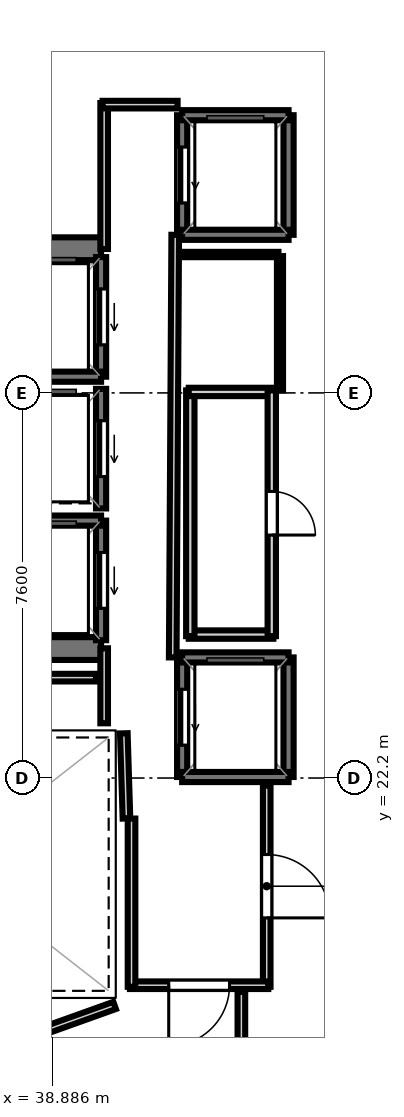
"""IFC4 building model, lengths in metres.
Left out: names, types, materials, properties, quantities, classifications, styles, units other than length and angle.
Written with IfcOpenShell. Run it as: python <this file> out.ifc"""

import sys

from ifc_helpers import new_model, si_unit, direction, frame, frame_2d, origin, place, context, subcontext, project, spatial, rectangle, extrude, element, fill, save


model = new_model("IFC4")
c1 = context("Model", 3, precision=1e-05, world=origin(), true_north=direction((0.0, 1.0)))
c2 = subcontext(c1, "Body", "Model", "MODEL_VIEW")
j1 = project(units=[si_unit("LENGTHUNIT", "METRE"), si_unit("PLANEANGLEUNIT", "RADIAN")], contexts=[c1])
p1 = place(None, origin())
s1 = spatial("IfcSite", under=j1, at=p1, CompositionType="ELEMENT")
p2 = place(p1, origin())
s2 = spatial("IfcBuilding", under=s1, at=p2, CompositionType="ELEMENT")
p3 = place(p2, frame((0.0, 0.0, 344.4)))
s3 = spatial("IfcBuildingStorey", under=s2, at=p3, CompositionType="ELEMENT", Elevation=344.4)
p4 = place(p3, frame((29.33, 32.645, 0.0), z_axis=(0.0, 0.0, 1.0), x_axis=(1.0, 0.0, 0.0)))
e1 = element("IfcWall", 1, at=p4, inside=s3, PredefinedType="SHEAR", context=c2, shape_type="SweptSolid", body=[
    extrude(rectangle(XDim=10.52, YDim=0.45, at=frame_2d((5.26, 0.0))), origin(), (0.0, 0.0, 1.0), 3.52),
])
p5 = place(p4, frame((0.895, 0.0, 0.0)))
e2 = element("IfcOpeningElement", 2, at=p5, cuts=e1, PredefinedType="OPENING", context=c2, shape_type="SweptSolid", body=[
    extrude(rectangle(XDim=1.25, YDim=2.15, at=frame_2d((0.625, 1.075))), frame((0.0, 0.235, 0.0), z_axis=(0.0, -1.0, 0.0), x_axis=(1.0, 0.0, 0.0)), (0.0, 0.0, 1.0), 0.47),
])
p6 = place(p3, frame((29.33, 24.755, 0.0), z_axis=(0.0, 0.0, 1.0), x_axis=(1.0, 0.0, 0.0)))
e3 = element("IfcWall", 3, at=p6, inside=s3, PredefinedType="SHEAR", context=c2, shape_type="SweptSolid", body=[
    extrude(rectangle(XDim=10.52, YDim=0.45, at=frame_2d((5.26, 0.0))), origin(), (0.0, 0.0, 1.0), 3.52),
])
p7 = place(p6, frame((0.695, 0.0, 0.0)))
e4 = element("IfcOpeningElement", 4, at=p7, cuts=e3, PredefinedType="OPENING", context=c2, shape_type="SweptSolid", body=[
    extrude(rectangle(XDim=1.25, YDim=2.15, at=frame_2d((0.625, 1.075))), frame((0.0, 0.235, 0.0), z_axis=(0.0, -1.0, 0.0), x_axis=(1.0, 0.0, 0.0)), (0.0, 0.0, 1.0), 0.47),
])
p8 = place(p3, frame((39.85, 30.12, 0.0), z_axis=(0.0, 0.0, 1.0), x_axis=(0.0, 1.0, 0.0)))
e5 = element("IfcWall", 5, at=p8, inside=s3, PredefinedType="SOLIDWALL", context=c2, shape_type="SweptSolid", body=[
    extrude(rectangle(XDim=2.36, YDim=0.2, at=frame_2d((1.18, 0.0))), origin(), (0.0, 0.0, 1.0), 3.52),
])
p9 = place(p8, frame((0.63, 0.0, 0.0)))
e6 = element("IfcOpeningElement", 6, at=p9, cuts=e5, PredefinedType="OPENING", context=c2, shape_type="SweptSolid", body=[
    extrude(rectangle(XDim=1.1, YDim=2.15, at=frame_2d((0.55, 1.075))), frame((0.0, 0.11, 0.0), z_axis=(0.0, -1.0, 0.0), x_axis=(1.0, 0.0, 0.0)), (0.0, 0.0, 1.0), 0.22),
])
p10 = place(p3, frame((37.75, 30.12, 0.0), z_axis=(0.0, 0.0, 1.0), x_axis=(1.0, 0.0, 0.0)))
e7 = element("IfcWall", 7, at=p10, inside=s3, PredefinedType="SOLIDWALL", context=c2, shape_type="SweptSolid", body=[
    extrude(rectangle(XDim=2.1, YDim=0.2, at=frame_2d((1.05, 0.0))), origin(), (0.0, 0.0, 1.0), 3.52),
])
p11 = place(p3, frame((39.85, 24.92, 0.0), z_axis=(0.0, 0.0, 1.0), x_axis=(0.0, 1.0, 0.0)))
e8 = element("IfcWall", 8, at=p11, inside=s3, PredefinedType="SOLIDWALL", context=c2, shape_type="SweptSolid", body=[
    extrude(rectangle(XDim=2.36, YDim=0.2, at=frame_2d((1.18, 0.0))), origin(), (0.0, 0.0, 1.0), 3.52),
])
p12 = place(p11, frame((0.63, 0.0, 0.0)))
e9 = element("IfcOpeningElement", 9, at=p12, cuts=e8, PredefinedType="OPENING", context=c2, shape_type="SweptSolid", body=[
    extrude(rectangle(XDim=1.1, YDim=2.15, at=frame_2d((0.55, 1.075))), frame((0.0, 0.11, 0.0), z_axis=(0.0, -1.0, 0.0), x_axis=(1.0, 0.0, 0.0)), (0.0, 0.0, 1.0), 0.22),
])
p13 = place(p3, frame((37.75, 27.28, 0.0), z_axis=(0.0, 0.0, 1.0), x_axis=(1.0, 0.0, 0.0)))
e10 = element("IfcWall", 10, at=p13, inside=s3, PredefinedType="SOLIDWALL", context=c2, shape_type="SweptSolid", body=[
    extrude(rectangle(XDim=2.1, YDim=0.2, at=frame_2d((1.05, 0.0))), origin(), (0.0, 0.0, 1.0), 3.52),
])
p14 = place(p3, frame((39.85, 27.52, 0.0), z_axis=(0.0, 0.0, 1.0), x_axis=(0.0, 1.0, 0.0)))
e11 = element("IfcWall", 11, at=p14, inside=s3, PredefinedType="SOLIDWALL", context=c2, shape_type="SweptSolid", body=[
    extrude(rectangle(XDim=2.36, YDim=0.2, at=frame_2d((1.18, 0.0))), origin(), (0.0, 0.0, 1.0), 3.52),
])
p15 = place(p14, frame((0.63, 0.0, 0.0)))
e12 = element("IfcOpeningElement", 12, at=p15, cuts=e11, PredefinedType="OPENING", context=c2, shape_type="SweptSolid", body=[
    extrude(rectangle(XDim=1.1, YDim=2.15, at=frame_2d((0.55, 1.075))), frame((0.0, 0.11, 0.0), z_axis=(0.0, -1.0, 0.0), x_axis=(1.0, 0.0, 0.0)), (0.0, 0.0, 1.0), 0.22),
])
p16 = place(p3, frame((43.55, 22.22, 0.0), z_axis=(0.0, 0.0, 1.0), x_axis=(0.0, 1.0, 0.0)))
e13 = element("IfcWall", 13, at=p16, inside=s3, PredefinedType="SOLIDWALL", context=c2, shape_type="SweptSolid", body=[
    extrude(rectangle(XDim=2.36, YDim=0.2, at=frame_2d((1.18, 0.0))), origin(), (0.0, 0.0, 1.0), 3.52),
])
p17 = place(p3, frame((41.45, 22.22, 0.0), z_axis=(0.0, 0.0, 1.0), x_axis=(0.0, 1.0, 0.0)))
e14 = element("IfcWall", 14, at=p17, inside=s3, PredefinedType="SOLIDWALL", context=c2, shape_type="SweptSolid", body=[
    extrude(rectangle(XDim=2.36, YDim=0.2, at=frame_2d((1.18, 0.0))), origin(), (0.0, 0.0, 1.0), 3.52),
])
p18 = place(p17, frame((0.63, 0.0, 0.0)))
e15 = element("IfcOpeningElement", 15, at=p18, cuts=e14, PredefinedType="OPENING", context=c2, shape_type="SweptSolid", body=[
    extrude(rectangle(XDim=1.1, YDim=2.15, at=frame_2d((0.55, 1.075))), frame((0.0, 0.11, 0.0), z_axis=(0.0, -1.0, 0.0), x_axis=(1.0, 0.0, 0.0)), (0.0, 0.0, 1.0), 0.22),
])
for number, where, z_axis, x_axis in (
    (16, (41.45, 24.58, 0.0), (0.0, 0.0, 1.0), (1.0, 0.0, 0.0)),
    (17, (41.45, 22.22, 0.0), (0.0, 0.0, 1.0), (1.0, 0.0, 0.0)),
):
    element("IfcWall", number, at=place(p3, frame(where, z_axis=z_axis, x_axis=x_axis)), inside=s3, PredefinedType="SOLIDWALL", context=c2, shape_type="SweptSolid", body=[
        extrude(rectangle(XDim=2.1, YDim=0.2, at=frame_2d((1.05, 0.0))), origin(), (0.0, 0.0, 1.0), 3.52),
    ])
p19 = place(p3, frame((43.55, 32.92, 0.0), z_axis=(0.0, 0.0, 1.0), x_axis=(0.0, 1.0, 0.0)))
e18 = element("IfcWall", 18, at=p19, inside=s3, PredefinedType="SOLIDWALL", context=c2, shape_type="SweptSolid", body=[
    extrude(rectangle(XDim=2.36, YDim=0.2, at=frame_2d((1.18, 0.0))), origin(), (0.0, 0.0, 1.0), 3.52),
])
p20 = place(p3, frame((41.45, 32.92, 0.0), z_axis=(0.0, 0.0, 1.0), x_axis=(0.0, 1.0, 0.0)))
e19 = element("IfcWall", 19, at=p20, inside=s3, PredefinedType="SOLIDWALL", context=c2, shape_type="SweptSolid", body=[
    extrude(rectangle(XDim=2.36, YDim=0.2, at=frame_2d((1.18, 0.0))), origin(), (0.0, 0.0, 1.0), 3.52),
])
p21 = place(p20, frame((0.63, 0.0, 0.0)))
e20 = element("IfcOpeningElement", 20, at=p21, cuts=e19, PredefinedType="OPENING", context=c2, shape_type="SweptSolid", body=[
    extrude(rectangle(XDim=1.1, YDim=2.15, at=frame_2d((0.55, 1.075))), frame((0.0, 0.11, 0.0), z_axis=(0.0, -1.0, 0.0), x_axis=(1.0, 0.0, 0.0)), (0.0, 0.0, 1.0), 0.22),
])
for number, where, z_axis, x_axis in (
    (21, (41.45, 35.28, 0.0), (0.0, 0.0, 1.0), (1.0, 0.0, 0.0)),
    (22, (41.45, 32.92, 0.0), (0.0, 0.0, 1.0), (1.0, 0.0, 0.0)),
):
    element("IfcWall", number, at=place(p3, frame(where, z_axis=z_axis, x_axis=x_axis)), inside=s3, PredefinedType="SOLIDWALL", context=c2, shape_type="SweptSolid", body=[
        extrude(rectangle(XDim=2.1, YDim=0.2, at=frame_2d((1.05, 0.0))), origin(), (0.0, 0.0, 1.0), 3.52),
    ])
p22 = place(p3, frame((40.351, 21.401, 0.0), z_axis=(0.0, 0.0, 1.0), x_axis=(-0.031058045979, 0.999517582527, 0.0)))
e23 = element("IfcWall", 23, at=p22, inside=s3, PredefinedType="PARTITIONING", context=c2, shape_type="SweptSolid", body=[
    extrude(rectangle(XDim=1.682, YDim=0.15, at=frame_2d((0.841, 0.0))), origin(), (0.0, 0.0, 1.0), 2.84),
])
p23 = place(p3, frame((39.911, 23.28, 0.0), z_axis=(0.0, 0.0, 1.0), x_axis=(0.0, 1.0, 0.0)))
e24 = element("IfcWall", 24, at=p23, inside=s3, PredefinedType="PARTITIONING", context=c2, shape_type="SweptSolid", body=[
    extrude(rectangle(XDim=1.48, YDim=0.15, at=frame_2d((0.74, 0.0))), origin(), (0.0, 0.0, 1.0), 2.84),
])
p24 = place(p3, frame((39.911, 32.64, 0.0), z_axis=(0.0, 0.0, 1.0), x_axis=(0.0, 1.0, 0.0)))
e25 = element("IfcWall", 25, at=p24, inside=s3, PredefinedType="PARTITIONING", context=c2, shape_type="SweptSolid", body=[
    extrude(rectangle(XDim=2.88, YDim=0.15, at=frame_2d((1.44, 0.0))), origin(), (0.0, 0.0, 1.0), 2.84),
])
p25 = place(p3, frame((39.88, 35.489, 0.0), z_axis=(0.0, 0.0, 1.0), x_axis=(1.0, 0.0, 0.0)))
e26 = element("IfcWall", 26, at=p25, inside=s3, PredefinedType="PARTITIONING", context=c2, shape_type="SweptSolid", body=[
    extrude(rectangle(XDim=1.48, YDim=0.15, at=frame_2d((0.74, 0.0))), origin(), (0.0, 0.0, 1.0), 2.84),
])
p26 = place(p3, frame((41.313, 32.92, 0.0), z_axis=(0.0, 0.0, 1.0), x_axis=(-0.005942518022, -0.999982343084, 0.0)))
e27 = element("IfcWall", 27, at=p26, inside=s3, PredefinedType="PARTITIONING", context=c2, shape_type="SweptSolid", body=[
    extrude(rectangle(XDim=8.34, YDim=0.15, at=frame_2d((4.17, 0.0))), origin(), (0.0, 0.0, 1.0), 2.84),
])
p27 = place(p3, frame((43.119, 22.05, 0.0), z_axis=(0.0, 0.0, 1.0), x_axis=(0.0, -1.0, 0.0)))
e28 = element("IfcWall", 28, at=p27, inside=s3, PredefinedType="PARTITIONING", context=c2, shape_type="SweptSolid", body=[
    extrude(rectangle(XDim=3.97, YDim=0.15, at=frame_2d((1.985, 0.0))), origin(), (0.0, 0.0, 1.0), 2.84),
])
p28 = place(p27, frame((1.36, 0.0, 0.0)))
e29 = element("IfcOpeningElement", 29, at=p28, cuts=e28, PredefinedType="OPENING", context=c2, shape_type="SweptSolid", body=[
    extrude(rectangle(XDim=1.25, YDim=2.2, at=frame_2d((0.625, 1.1))), frame((0.0, 0.085, 0.0), z_axis=(0.0, -1.0, 0.0), x_axis=(1.0, 0.0, 0.0)), (0.0, 0.0, 1.0), 0.17),
])
p29 = place(p3, frame((43.15, 18.111, 0.0), z_axis=(0.0, 0.0, 1.0), x_axis=(-1.0, 0.0, 0.0)))
e30 = element("IfcWall", 30, at=p29, inside=s3, PredefinedType="PARTITIONING", context=c2, shape_type="SweptSolid", body=[
    extrude(rectangle(XDim=2.73, YDim=0.15, at=frame_2d((1.365, 0.0))), origin(), (0.0, 0.0, 1.0), 2.84),
])
p30 = place(p29, frame((0.765, 0.0, 0.0)))
e31 = element("IfcOpeningElement", 31, at=p30, cuts=e30, PredefinedType="OPENING", context=c2, shape_type="SweptSolid", body=[
    extrude(rectangle(XDim=1.2, YDim=2.15, at=frame_2d((0.6, 1.075))), frame((0.0, 0.085, 0.0), z_axis=(0.0, -1.0, 0.0), x_axis=(1.0, 0.0, 0.0)), (0.0, 0.0, 1.0), 0.17),
])
p31 = place(p3, frame((40.451, 18.08, 0.0), z_axis=(0.0, 0.0, 1.0), x_axis=(0.0, 1.0, 0.0)))
e32 = element("IfcWall", 32, at=p31, inside=s3, PredefinedType="PARTITIONING", context=c2, shape_type="SweptSolid", body=[
    extrude(rectangle(XDim=3.32, YDim=0.15, at=frame_2d((1.66, 0.0))), origin(), (0.0, 0.0, 1.0), 2.84),
])
p32 = place(p3, frame((43.25, 25.031, 0.0), z_axis=(0.0, 0.0, 1.0), x_axis=(-1.0, 0.0, 0.0)))
e33 = element("IfcWall", 33, at=p32, inside=s3, PredefinedType="PLUMBINGWALL", context=c2, shape_type="SweptSolid", body=[
    extrude(rectangle(XDim=1.67, YDim=0.165, at=frame_2d((0.835, 0.0))), origin(), (0.0, 0.0, 1.0), 2.84),
])
p33 = place(p3, frame((41.611, 25.0, 0.0), z_axis=(0.0, 0.0, 1.0), x_axis=(0.0, 1.0, 0.0)))
e34 = element("IfcWall", 34, at=p33, inside=s3, PredefinedType="PLUMBINGWALL", context=c2, shape_type="SweptSolid", body=[
    extrude(rectangle(XDim=4.85, YDim=0.165, at=frame_2d((2.425, 0.0))), origin(), (0.0, 0.0, 1.0), 2.84),
])
p34 = place(p3, frame((41.58, 29.819, 0.0), z_axis=(0.0, 0.0, 1.0), x_axis=(1.0, 0.0, 0.0)))
e35 = element("IfcWall", 35, at=p34, inside=s3, PredefinedType="PLUMBINGWALL", context=c2, shape_type="SweptSolid", body=[
    extrude(rectangle(XDim=1.67, YDim=0.165, at=frame_2d((0.835, 0.0))), origin(), (0.0, 0.0, 1.0), 2.84),
])
p35 = place(p3, frame((43.219, 29.85, 0.0), z_axis=(0.0, 0.0, 1.0), x_axis=(0.0, -1.0, 0.0)))
e36 = element("IfcWall", 36, at=p35, inside=s3, PredefinedType="PLUMBINGWALL", context=c2, shape_type="SweptSolid", body=[
    extrude(rectangle(XDim=4.85, YDim=0.165, at=frame_2d((2.425, 0.0))), origin(), (0.0, 0.0, 1.0), 2.84),
])
p36 = place(p35, frame((1.995, 0.0, 0.0)))
e37 = element("IfcOpeningElement", 37, at=p36, cuts=e36, PredefinedType="OPENING", context=c2, shape_type="SweptSolid", body=[
    extrude(rectangle(XDim=0.86, YDim=2.05, at=frame_2d((0.43, 1.025))), frame((0.0, 0.093, 0.0), z_axis=(0.0, -1.0, 0.0), x_axis=(1.0, 0.0, 0.0)), (0.0, 0.0, 1.0), 0.185),
])
p37 = place(p3, frame((39.75, 24.181, 0.0), z_axis=(0.0, 0.0, 1.0), x_axis=(-1.0, 0.0, 0.0)))
e38 = element("IfcWall", 38, at=p37, inside=s3, PredefinedType="PARTITIONING", context=c2, shape_type="SweptSolid", body=[
    extrude(rectangle(XDim=6.22, YDim=0.15, at=frame_2d((3.11, 0.0))), origin(), (0.0, 0.0, 1.0), 2.84),
])
p38 = place(p3, frame((36.81, 16.529, 0.0), z_axis=(0.0, 0.0, 1.0), x_axis=(0.941548344365, 0.33687789364, 0.0)))
e39 = element("IfcWall", 39, at=p38, inside=s3, PredefinedType="PARTITIONING", context=c2, shape_type="SweptSolid", body=[
    extrude(rectangle(XDim=3.513, YDim=0.15, at=frame_2d((1.756, 0.0))), origin(), (0.0, 0.0, 1.0), 2.84),
])
p39 = place(p3, frame((42.619, 17.98, 0.0), z_axis=(0.0, 0.0, 1.0), x_axis=(0.0, -1.0, 0.0)))
e40 = element("IfcWall", 40, at=p39, inside=s3, PredefinedType="PARTITIONING", context=c2, shape_type="SweptSolid", body=[
    extrude(rectangle(XDim=1.93, YDim=0.15, at=frame_2d((0.965, 0.0))), origin(), (0.0, 0.0, 1.0), 2.84),
])
p40 = place(p3, frame((43.381, 29.85, 0.0), z_axis=(0.0, 0.0, 1.0), x_axis=(0.0, 1.0, 0.0)))
e41 = element("IfcWall", 41, at=p40, inside=s3, PredefinedType="PARTITIONING", context=c2, shape_type="SweptSolid", body=[
    extrude(rectangle(XDim=2.65, YDim=0.12, at=frame_2d((1.325, 0.0))), origin(), (0.0, 0.0, 1.0), 2.84),
])
p41 = place(p3, frame((43.35, 32.531, 0.0), z_axis=(0.0, 0.0, 1.0), x_axis=(-1.0, 0.0, 0.0)))
e42 = element("IfcWall", 42, at=p41, inside=s3, PredefinedType="PARTITIONING", context=c2, shape_type="SweptSolid", body=[
    extrude(rectangle(XDim=1.91, YDim=0.105, at=frame_2d((0.955, 0.0))), origin(), (0.0, 0.0, 1.0), 2.84),
])
p42 = place(p3, frame((53.102, 40.593, 0.0), z_axis=(0.0, 0.0, 1.0), x_axis=(-0.337534144826, -0.941313285297, 0.0)))
e43 = element("IfcWall", 43, at=p42, inside=s3, PredefinedType="PARTITIONING", context=c2, shape_type="SweptSolid", body=[
    extrude(rectangle(XDim=35.075, YDim=0.12, at=frame_2d((17.538, 0.0))), origin(), (0.0, 0.0, 1.0), 2.84),
])
p43 = place(p9, origin())
e44 = element("IfcDoor", 44, at=p43, inside=s3, OperationType="SLIDING_TO_LEFT", PredefinedType="DOOR", context=c2, shape_type="SweptSolid", body=[
    extrude(rectangle(XDim=1.1, YDim=2.15, at=frame_2d((0.55, 1.075))), frame((0.0, 0.025, 0.0), z_axis=(0.0, -1.0, 0.0), x_axis=(1.0, 0.0, 0.0)), (0.0, 0.0, 1.0), 0.05),
])
fill(e6, e44)
p44 = place(p12, origin())
e45 = element("IfcDoor", 45, at=p44, inside=s3, OperationType="SLIDING_TO_LEFT", PredefinedType="DOOR", context=c2, shape_type="SweptSolid", body=[
    extrude(rectangle(XDim=1.1, YDim=2.15, at=frame_2d((0.55, 1.075))), frame((0.0, 0.025, 0.0), z_axis=(0.0, -1.0, 0.0), x_axis=(1.0, 0.0, 0.0)), (0.0, 0.0, 1.0), 0.05),
])
fill(e9, e45)
p45 = place(p15, origin())
e46 = element("IfcDoor", 46, at=p45, inside=s3, OperationType="SLIDING_TO_LEFT", PredefinedType="DOOR", context=c2, shape_type="SweptSolid", body=[
    extrude(rectangle(XDim=1.1, YDim=2.15, at=frame_2d((0.55, 1.075))), frame((0.0, 0.025, 0.0), z_axis=(0.0, -1.0, 0.0), x_axis=(1.0, 0.0, 0.0)), (0.0, 0.0, 1.0), 0.05),
])
fill(e12, e46)
p46 = place(p18, origin())
e47 = element("IfcDoor", 47, at=p46, inside=s3, OperationType="SLIDING_TO_LEFT", PredefinedType="DOOR", context=c2, shape_type="SweptSolid", body=[
    extrude(rectangle(XDim=1.1, YDim=2.15, at=frame_2d((0.55, 1.075))), frame((0.0, 0.025, 0.0), z_axis=(0.0, -1.0, 0.0), x_axis=(1.0, 0.0, 0.0)), (0.0, 0.0, 1.0), 0.05),
])
fill(e15, e47)
p47 = place(p21, origin())
e48 = element("IfcDoor", 48, at=p47, inside=s3, OperationType="SLIDING_TO_LEFT", PredefinedType="DOOR", context=c2, shape_type="SweptSolid", body=[
    extrude(rectangle(XDim=1.1, YDim=2.15, at=frame_2d((0.55, 1.075))), frame((0.0, 0.025, 0.0), z_axis=(0.0, -1.0, 0.0), x_axis=(1.0, 0.0, 0.0)), (0.0, 0.0, 1.0), 0.05),
])
fill(e20, e48)
p48 = place(p30, origin())
e49 = element("IfcDoor", 49, at=p48, inside=s3, OperationType="SINGLE_SWING_RIGHT", PredefinedType="DOOR", context=c2, shape_type="SweptSolid", body=[
    extrude(rectangle(XDim=1.2, YDim=2.15, at=frame_2d((0.6, 1.075))), frame((0.0, 0.025, 0.0), z_axis=(0.0, -1.0, 0.0), x_axis=(1.0, 0.0, 0.0)), (0.0, 0.0, 1.0), 0.05),
])
fill(e31, e49)
p49 = place(p28, origin())
e50 = element("IfcDoor", 50, at=p49, inside=s3, OperationType="SINGLE_SWING_RIGHT", PredefinedType="DOOR", context=c2, shape_type="SweptSolid", body=[
    extrude(rectangle(XDim=1.25, YDim=2.2, at=frame_2d((0.625, 1.1))), frame((0.0, 0.025, 0.0), z_axis=(0.0, -1.0, 0.0), x_axis=(1.0, 0.0, 0.0)), (0.0, 0.0, 1.0), 0.05),
])
fill(e29, e50)
p50 = place(p36, origin())
e51 = element("IfcDoor", 51, at=p50, inside=s3, OperationType="SINGLE_SWING_RIGHT", PredefinedType="DOOR", context=c2, shape_type="SweptSolid", body=[
    extrude(rectangle(XDim=0.86, YDim=2.05, at=frame_2d((0.43, 1.025))), frame((0.0, 0.025, 0.0), z_axis=(0.0, -1.0, 0.0), x_axis=(1.0, 0.0, 0.0)), (0.0, 0.0, 1.0), 0.05),
])
fill(e37, e51)
save(model, sys.argv[1])
